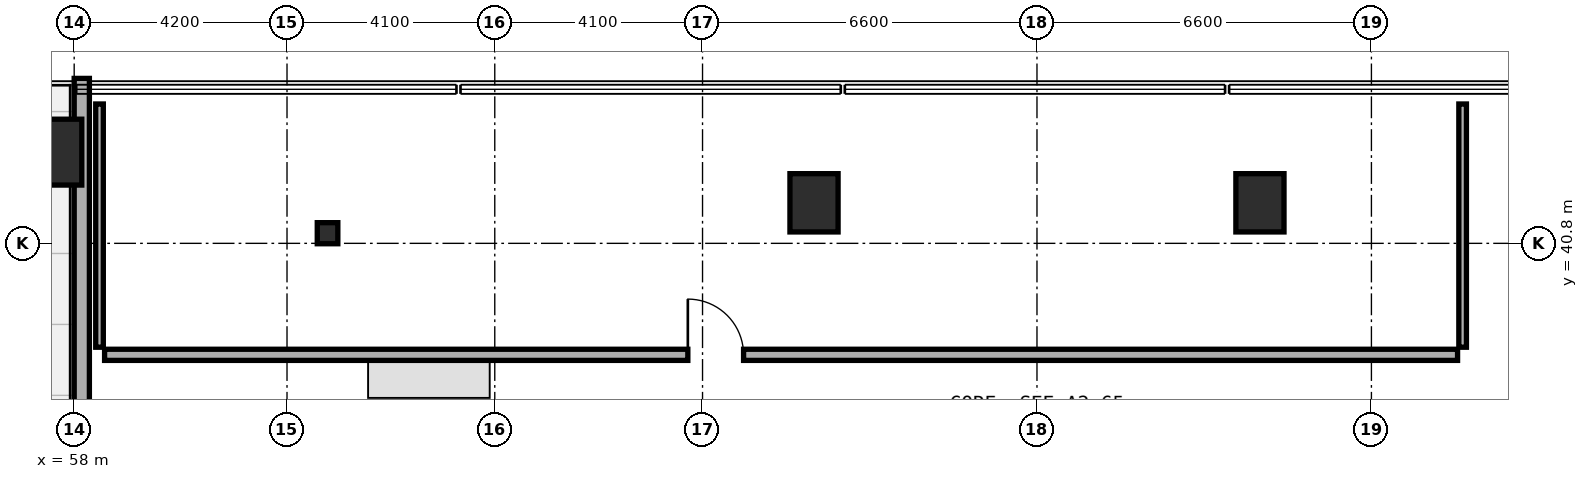
"""IFC4 building model, lengths in metres.
Left out: names, types, materials, properties, quantities, classifications, styles, units other than length and angle.
Written with IfcOpenShell. Run it as: python <this file> out.ifc"""

import sys

from ifc_helpers import new_model, si_unit, direction, frame, frame_2d, origin, origin_2d, place, context, subcontext, project, spatial, rectangle, i_section, extrude, element, fill, save


model = new_model("IFC4")
c1 = context("Model", 3, precision=1e-05, world=origin(), true_north=direction((0.0, 1.0)))
c2 = subcontext(c1, "Body", "Model", "MODEL_VIEW")
j1 = project(units=[si_unit("LENGTHUNIT", "METRE"), si_unit("PLANEANGLEUNIT", "RADIAN")], contexts=[c1])
p1 = place(None, origin())
s1 = spatial("IfcSite", under=j1, at=p1, CompositionType="ELEMENT")
p2 = place(p1, origin())
s2 = spatial("IfcBuilding", under=s1, at=p2, CompositionType="ELEMENT")
p3 = place(p2, frame((0.0, 0.0, 19.5)))
s3 = spatial("IfcBuildingStorey", under=s2, at=p3, CompositionType="ELEMENT", Elevation=19.5)
for number, where, z_axis, x_axis in (
    (1, (72.6, 41.6, 0.0), (0.0, 0.0, 1.0), (1.0, 0.0, 0.0)),
    (2, (81.4, 41.6, 0.0), (0.0, 0.0, 1.0), (1.0, 0.0, 0.0)),
):
    element("IfcColumn", number, at=place(p3, frame(where, z_axis=z_axis, x_axis=x_axis)), inside=s3, PredefinedType="COLUMN", context=c2, shape_type="SweptSolid", body=[
        extrude(rectangle(XDim=0.95, YDim=1.15, at=origin_2d()), origin(), (0.0, 0.0, 1.0), 4.5),
    ])
p4 = place(p3, frame((63.0, 41.0, 0.0), z_axis=(0.0, 0.0, 1.0), x_axis=(1.0, 0.0, 0.0)))
e3 = element("IfcColumn", 3, at=p4, inside=s3, PredefinedType="COLUMN", context=c2, shape_type="SweptSolid", body=[
    extrude(i_section(OverallWidth=0.406, OverallDepth=0.416, WebThickness=0.024, FlangeThickness=0.039, FilletRadius=0.015, at=origin_2d()), origin(), (0.0, 0.0, 1.0), 4.5),
])
p5 = place(p3, frame((57.6, 42.6, 0.0), z_axis=(0.0, 0.0, 1.0), x_axis=(1.0, 0.0, 0.0)))
e4 = element("IfcColumn", 4, at=p5, inside=s3, PredefinedType="COLUMN", context=c2, shape_type="SweptSolid", body=[
    extrude(rectangle(XDim=1.1, YDim=1.3, at=origin_2d()), origin(), (0.0, 0.0, 1.0), 4.5),
])
p6 = place(p3, frame((58.15, 44.055, 0.0), z_axis=(0.0, 0.0, 1.0), x_axis=(0.0, -1.0, 0.0)))
e5 = element("IfcWall", 5, at=p6, inside=s3, PredefinedType="STANDARD", context=c2, shape_type="SweptSolid", body=[
    extrude(rectangle(XDim=11.68, YDim=0.3, at=frame_2d((5.84, 0.0))), origin(), (0.0, 0.0, 1.0), 4.22),
])
p7 = place(p3, frame((58.5, 38.75, 0.0), z_axis=(0.0, 0.0, 1.0), x_axis=(0.0, 1.0, 0.0)))
e6 = element("IfcWall", 6, at=p7, inside=s3, PredefinedType="PARTITIONING", context=c2, shape_type="SweptSolid", body=[
    extrude(rectangle(XDim=4.8, YDim=0.15, at=frame_2d((2.4, 0.0))), origin(), (0.0, 0.0, 1.0), 4.22),
])
p8 = place(p3, frame((85.4, 38.75, 0.0), z_axis=(0.0, 0.0, 1.0), x_axis=(0.0, 1.0, 0.0)))
e7 = element("IfcWall", 7, at=p8, inside=s3, PredefinedType="PARTITIONING", context=c2, shape_type="SweptSolid", body=[
    extrude(rectangle(XDim=4.8, YDim=0.15, at=frame_2d((2.4, 0.0))), origin(), (0.0, 0.0, 1.0), 3.865),
])
p9 = place(p3, frame((58.6, 38.6, 0.0), z_axis=(0.0, 0.0, 1.0), x_axis=(1.0, 0.0, 0.0)))
e8 = element("IfcWall", 8, at=p9, inside=s3, PredefinedType="SOLIDWALL", context=c2, shape_type="SweptSolid", body=[
    extrude(rectangle(XDim=26.7, YDim=0.22, at=frame_2d((13.35, 0.0))), origin(), (0.0, 0.0, 1.0), 3.725),
])
p10 = place(p9, frame((11.51, 0.0, 0.0)))
e9 = element("IfcOpeningElement", 9, at=p10, cuts=e8, PredefinedType="OPENING", context=c2, shape_type="SweptSolid", body=[
    extrude(rectangle(XDim=1.1, YDim=2.1, at=frame_2d((0.55, 1.05))), frame((0.0, 0.12, 0.0), z_axis=(0.0, -1.0, 0.0), x_axis=(1.0, 0.0, 0.0)), (0.0, 0.0, 1.0), 0.24),
])
p11 = place(p10, origin())
e10 = element("IfcDoor", 10, at=p11, inside=s3, OperationType="SINGLE_SWING_LEFT", PredefinedType="DOOR", context=c2, shape_type="SweptSolid", body=[
    extrude(rectangle(XDim=1.1, YDim=2.1, at=frame_2d((0.55, 1.05))), frame((0.0, 0.025, 0.0), z_axis=(0.0, -1.0, 0.0), x_axis=(1.0, 0.0, 0.0)), (0.0, 0.0, 1.0), 0.05),
])
fill(e9, e10)
save(model, sys.argv[1])
